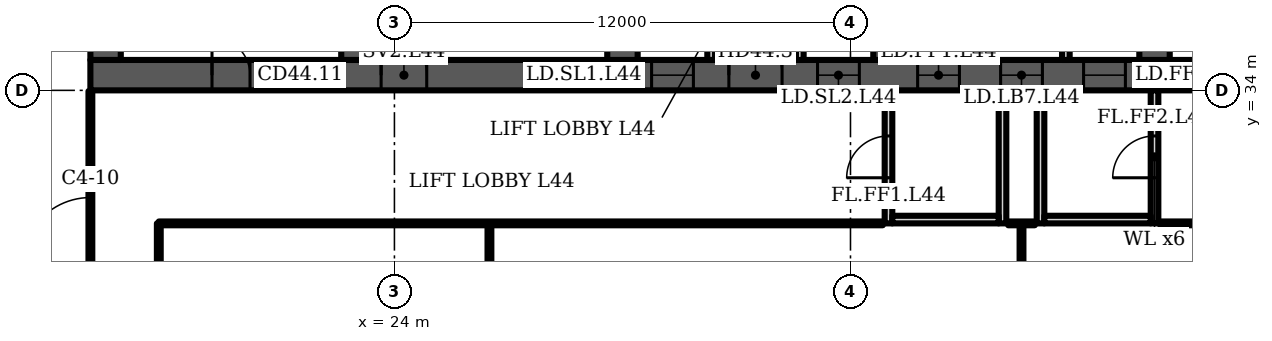
"""IFC4 building model, lengths in metres.
Left out: names, types, materials, properties, quantities, classifications, styles, units other than length and angle.
Written with IfcOpenShell. Run it as: python <this file> out.ifc"""

import sys

from ifc_helpers import new_model, si_unit, direction, frame, frame_2d, origin, place, context, subcontext, project, spatial, polyline, rectangle, outline, extrude, element, fill, save


model = new_model("IFC4")
c1 = context("Model", 3, precision=1e-05, world=origin(), true_north=direction((0.0, 1.0)))
c2 = subcontext(c1, "Body", "Model", "MODEL_VIEW")
j1 = project(units=[si_unit("LENGTHUNIT", "METRE"), si_unit("PLANEANGLEUNIT", "RADIAN")], contexts=[c1])
p1 = place(None, origin())
s1 = spatial("IfcSite", under=j1, at=p1, CompositionType="ELEMENT")
p2 = place(p1, origin())
s2 = spatial("IfcBuilding", under=s1, at=p2, CompositionType="ELEMENT")
p3 = place(p2, frame((0.0, 0.0, 180.7)))
s3 = spatial("IfcBuildingStorey", under=s2, at=p3, CompositionType="ELEMENT", Elevation=180.7)
p4 = place(p3, frame((16.0, 34.4, 0.0), z_axis=(0.0, 0.0, 1.0), x_axis=(1.0, 0.0, 0.0)))
e1 = element("IfcWall", 1, at=p4, inside=s3, PredefinedType="SHEAR", context=c2, shape_type="SweptSolid", body=[
    extrude(rectangle(XDim=42.0, YDim=0.8, at=frame_2d((21.0, 0.0))), origin(), (0.0, 0.0, 1.0), 3.6),
])
p5 = place(p4, frame((3.2, 0.0, 0.0)))
e2 = element("IfcOpeningElement", 2, at=p5, cuts=e1, PredefinedType="OPENING", context=c2, shape_type="SweptSolid", body=[
    extrude(rectangle(XDim=1.0, YDim=2.1, at=frame_2d((0.5, 1.05))), frame((0.0, 0.41, 0.0), z_axis=(0.0, -1.0, 0.0), x_axis=(1.0, 0.0, 0.0)), (0.0, 0.0, 1.0), 0.82),
])
p6 = place(p4, frame((7.65, 0.0, 0.0)))
e3 = element("IfcOpeningElement", 3, at=p6, cuts=e1, PredefinedType="OPENING", context=c2, shape_type="SweptSolid", body=[
    extrude(rectangle(XDim=1.2, YDim=2.1, at=frame_2d((0.6, 1.05))), frame((0.0, 0.41, 0.0), z_axis=(0.0, -1.0, 0.0), x_axis=(1.0, 0.0, 0.0)), (0.0, 0.0, 1.0), 0.82),
])
p7 = place(p4, frame((14.767, 0.0, 0.0)))
e4 = element("IfcOpeningElement", 4, at=p7, cuts=e1, PredefinedType="OPENING", context=c2, shape_type="SweptSolid", body=[
    extrude(rectangle(XDim=1.1, YDim=2.1, at=frame_2d((0.55, 1.05))), frame((0.0, 0.41, 0.0), z_axis=(0.0, -1.0, 0.0), x_axis=(1.0, 0.0, 0.0)), (0.0, 0.0, 1.0), 0.82),
])
p8 = place(p4, frame((19.133, 0.0, 0.0)))
e5 = element("IfcOpeningElement", 5, at=p8, cuts=e1, PredefinedType="OPENING", context=c2, shape_type="SweptSolid", body=[
    extrude(rectangle(XDim=1.1, YDim=2.1, at=frame_2d((0.55, 1.05))), frame((0.0, 0.41, 0.0), z_axis=(0.0, -1.0, 0.0), x_axis=(1.0, 0.0, 0.0)), (0.0, 0.0, 1.0), 0.82),
])
p9 = place(p4, frame((16.8, 0.0, 0.0)))
e6 = element("IfcOpeningElement", 6, at=p9, cuts=e1, PredefinedType="OPENING", context=c2, shape_type="SweptSolid", body=[
    extrude(rectangle(XDim=1.4, YDim=2.1, at=frame_2d((0.7, 1.05))), frame((0.0, 0.41, 0.0), z_axis=(0.0, -1.0, 0.0), x_axis=(1.0, 0.0, 0.0)), (0.0, 0.0, 1.0), 0.82),
])
p10 = place(p4, frame((21.767, 0.0, 0.0)))
e7 = element("IfcOpeningElement", 7, at=p10, cuts=e1, PredefinedType="OPENING", context=c2, shape_type="SweptSolid", body=[
    extrude(rectangle(XDim=1.1, YDim=2.1, at=frame_2d((0.55, 1.05))), frame((0.0, 0.41, 0.0), z_axis=(0.0, -1.0, 0.0), x_axis=(1.0, 0.0, 0.0)), (0.0, 0.0, 1.0), 0.82),
])
p11 = place(p4, frame((23.95, 0.0, 0.0)))
e8 = element("IfcOpeningElement", 8, at=p11, cuts=e1, PredefinedType="OPENING", context=c2, shape_type="SweptSolid", body=[
    extrude(rectangle(XDim=1.1, YDim=2.1, at=frame_2d((0.55, 1.05))), frame((0.0, 0.41, 0.0), z_axis=(0.0, -1.0, 0.0), x_axis=(1.0, 0.0, 0.0)), (0.0, 0.0, 1.0), 0.82),
])
p12 = place(p4, frame((26.133, 0.0, 0.0)))
e9 = element("IfcOpeningElement", 9, at=p12, cuts=e1, PredefinedType="OPENING", context=c2, shape_type="SweptSolid", body=[
    extrude(rectangle(XDim=1.1, YDim=2.1, at=frame_2d((0.55, 1.05))), frame((0.0, 0.41, 0.0), z_axis=(0.0, -1.0, 0.0), x_axis=(1.0, 0.0, 0.0)), (0.0, 0.0, 1.0), 0.82),
])
p13 = place(p4, frame((33.15, 0.0, 0.0)))
e10 = element("IfcOpeningElement", 10, at=p13, cuts=e1, PredefinedType="OPENING", context=c2, shape_type="SweptSolid", body=[
    extrude(rectangle(XDim=1.2, YDim=2.1, at=frame_2d((0.6, 1.05))), frame((0.0, 0.41, 0.0), z_axis=(0.0, -1.0, 0.0), x_axis=(1.0, 0.0, 0.0)), (0.0, 0.0, 1.0), 0.82),
])
p14 = place(p4, frame((37.767, 0.0, 0.0)))
e11 = element("IfcOpeningElement", 11, at=p14, cuts=e1, PredefinedType="OPENING", context=c2, shape_type="SweptSolid", body=[
    extrude(rectangle(XDim=1.4, YDim=2.1, at=frame_2d((0.7, 1.05))), frame((0.0, 0.41, 0.0), z_axis=(0.0, -1.0, 0.0), x_axis=(1.0, 0.0, 0.0)), (0.0, 0.0, 1.0), 0.82),
])
p15 = place(p3, frame((16.4, 34.8, 0.0), z_axis=(0.0, 0.0, 1.0), x_axis=(0.0, 1.0, 0.0)))
e12 = element("IfcWall", 12, at=p15, inside=s3, PredefinedType="SHEAR", context=c2, shape_type="SweptSolid", body=[
    extrude(rectangle(XDim=13.184, YDim=0.8, at=frame_2d((6.592, 0.0))), origin(), (0.0, 0.0, 1.0), 3.6),
])
p16 = place(p3, frame((23.0, 34.8, 0.0), z_axis=(0.0, 0.0, 1.0), x_axis=(0.0, 1.0, 0.0)))
e13 = element("IfcWall", 13, at=p16, inside=s3, PredefinedType="SHEAR", context=c2, shape_type="SweptSolid", body=[
    extrude(rectangle(XDim=13.762, YDim=0.8, at=frame_2d((6.881, 0.0))), origin(), (0.0, 0.0, 1.0), 3.6),
])
p17 = place(p16, frame((2.55, 0.0, 0.0)))
e14 = element("IfcOpeningElement", 14, at=p17, cuts=e13, PredefinedType="OPENING", context=c2, shape_type="SweptSolid", body=[
    extrude(rectangle(XDim=1.1, YDim=2.1, at=frame_2d((0.55, 1.05))), frame((0.0, 0.41, 0.0), z_axis=(0.0, -1.0, 0.0), x_axis=(1.0, 0.0, 0.0)), (0.0, 0.0, 1.0), 0.82),
])
p18 = place(p16, frame((10.0, 0.0, 0.0)))
e15 = element("IfcOpeningElement", 15, at=p18, cuts=e13, PredefinedType="OPENING", context=c2, shape_type="SweptSolid", body=[
    extrude(rectangle(XDim=1.0, YDim=2.1, at=frame_2d((0.5, 1.05))), frame((0.0, 0.41, 0.0), z_axis=(0.0, -1.0, 0.0), x_axis=(1.0, 0.0, 0.0)), (0.0, 0.0, 1.0), 0.82),
])
p19 = place(p3, frame((30.0, 34.8, 0.0), z_axis=(0.0, 0.0, 1.0), x_axis=(0.0, 1.0, 0.0)))
e16 = element("IfcWall", 16, at=p19, inside=s3, PredefinedType="SHEAR", context=c2, shape_type="SweptSolid", body=[
    extrude(rectangle(XDim=14.374, YDim=0.8, at=frame_2d((7.187, 0.0))), origin(), (0.0, 0.0, 1.0), 3.6),
])
p20 = place(p19, frame((3.6, 0.0, 0.0)))
e17 = element("IfcOpeningElement", 17, at=p20, cuts=e16, PredefinedType="OPENING", context=c2, shape_type="SweptSolid", body=[
    extrude(rectangle(XDim=1.1, YDim=2.1, at=frame_2d((0.55, 1.05))), frame((0.0, 0.41, 0.0), z_axis=(0.0, -1.0, 0.0), x_axis=(1.0, 0.0, 0.0)), (0.0, 0.0, 1.0), 0.82),
])
p21 = place(p3, frame((37.0, 34.8, 0.0), z_axis=(0.0, 0.0, 1.0), x_axis=(0.0, 1.0, 0.0)))
e18 = element("IfcWall", 18, at=p21, inside=s3, PredefinedType="SHEAR", context=c2, shape_type="SweptSolid", body=[
    extrude(rectangle(XDim=14.987, YDim=0.8, at=frame_2d((7.493, 0.0))), origin(), (0.0, 0.0, 1.0), 3.6),
])
p22 = place(p21, frame((11.312, 0.0, 0.0)))
e19 = element("IfcOpeningElement", 19, at=p22, cuts=e18, PredefinedType="OPENING", context=c2, shape_type="SweptSolid", body=[
    extrude(rectangle(XDim=1.0, YDim=2.1, at=frame_2d((0.5, 1.05))), frame((0.0, 0.41, 0.0), z_axis=(0.0, -1.0, 0.0), x_axis=(1.0, 0.0, 0.0)), (0.0, 0.0, 1.0), 0.82),
])
p23 = place(p21, frame((3.6, 0.0, 0.0)))
e20 = element("IfcOpeningElement", 20, at=p23, cuts=e18, PredefinedType="OPENING", context=c2, shape_type="SweptSolid", body=[
    extrude(rectangle(XDim=1.1, YDim=2.1, at=frame_2d((0.55, 1.05))), frame((0.0, 0.41, 0.0), z_axis=(0.0, -1.0, 0.0), x_axis=(1.0, 0.0, 0.0)), (0.0, 0.0, 1.0), 0.82),
])
p24 = place(p3, frame((44.0, 34.8, 0.0), z_axis=(0.0, 0.0, 1.0), x_axis=(0.0, 1.0, 0.0)))
e21 = element("IfcWall", 21, at=p24, inside=s3, PredefinedType="SHEAR", context=c2, shape_type="SweptSolid", body=[
    extrude(rectangle(XDim=14.374, YDim=0.8, at=frame_2d((7.187, 0.0))), origin(), (0.0, 0.0, 1.0), 3.6),
])
p25 = place(p24, frame((11.312, 0.0, 0.0)))
e22 = element("IfcOpeningElement", 22, at=p25, cuts=e21, PredefinedType="OPENING", context=c2, shape_type="SweptSolid", body=[
    extrude(rectangle(XDim=1.0, YDim=2.1, at=frame_2d((0.5, 1.05))), frame((0.0, 0.41, 0.0), z_axis=(0.0, -1.0, 0.0), x_axis=(1.0, 0.0, 0.0)), (0.0, 0.0, 1.0), 0.82),
])
p26 = place(p24, frame((3.6, 0.0, 0.0)))
e23 = element("IfcOpeningElement", 23, at=p26, cuts=e21, PredefinedType="OPENING", context=c2, shape_type="SweptSolid", body=[
    extrude(rectangle(XDim=1.1, YDim=2.1, at=frame_2d((0.55, 1.05))), frame((0.0, 0.41, 0.0), z_axis=(0.0, -1.0, 0.0), x_axis=(1.0, 0.0, 0.0)), (0.0, 0.0, 1.0), 0.82),
])
p27 = place(p3, frame((0.0, 0.0, -0.0)))
e24 = element("IfcWall", 24, at=p27, inside=s3, PredefinedType="PARTITIONING", context=c2, shape_type="SweptSolid", body=[
    extrude(outline(polyline([(32.233, 37.65), (30.4, 37.65), (30.4, 37.85), (32.233, 37.85), (32.433, 37.85), (32.433, 34.8), (32.233, 34.8), (32.233, 37.65)])), origin(), (0.0, 0.0, 1.0), 3.2),
])
p28 = place(p3, frame((0.0, 0.0, -0.0)))
e25 = element("IfcWall", 25, at=p28, inside=s3, PredefinedType="PARTITIONING", context=c2, shape_type="SweptSolid", body=[
    extrude(outline(polyline([(34.567, 37.85), (34.767, 37.85), (36.6, 37.85), (36.6, 37.65), (34.767, 37.65), (34.767, 34.8), (34.567, 34.8), (34.567, 37.85)])), origin(), (0.0, 0.0, 1.0), 3.2),
])
p29 = place(p3, frame((0.0, 0.0, -0.0)))
e26 = element("IfcWall", 26, at=p29, inside=s3, PredefinedType="PARTITIONING", context=c2, shape_type="SweptSolid", body=[
    extrude(outline(polyline([(41.567, 37.1), (39.433, 37.1), (39.433, 34.8), (39.233, 34.8), (39.233, 37.65), (37.4, 37.65), (37.4, 37.85), (39.233, 37.85), (39.433, 37.85), (39.433, 37.3), (41.567, 37.3), (41.567, 37.55), (41.767, 37.55), (43.6, 37.55), (43.6, 37.35), (41.767, 37.35), (41.767, 34.8), (41.567, 34.8), (41.567, 37.1)])), origin(), (0.0, 0.0, 1.0), 3.2),
])
p30 = place(p3, frame((37.0, 30.5, 0.0), z_axis=(0.0, 0.0, 1.0), x_axis=(0.0, 1.0, 0.0)))
e27 = element("IfcWall", 27, at=p30, inside=s3, PredefinedType="PARTITIONING", context=c2, shape_type="SweptSolid", body=[
    extrude(rectangle(XDim=3.5, YDim=0.2, at=frame_2d((1.75, 0.0))), origin(), (0.0, 0.0, 1.0), 3.2),
])
p31 = place(p30, frame((1.2, 0.0, 0.0)))
e28 = element("IfcOpeningElement", 28, at=p31, cuts=e27, PredefinedType="OPENING", context=c2, shape_type="SweptSolid", body=[
    extrude(rectangle(XDim=1.1, YDim=2.1, at=frame_2d((0.55, 1.05))), frame((0.0, 0.11, 0.0), z_axis=(0.0, -1.0, 0.0), x_axis=(1.0, 0.0, 0.0)), (0.0, 0.0, 1.0), 0.22),
])
p32 = place(p3, frame((40.0, 30.5, 0.0), z_axis=(0.0, 0.0, 1.0), x_axis=(0.0, 1.0, 0.0)))
e29 = element("IfcWall", 29, at=p32, inside=s3, PredefinedType="PARTITIONING", context=c2, shape_type="SweptSolid", body=[
    extrude(rectangle(XDim=3.5, YDim=0.2, at=frame_2d((1.75, 0.0))), origin(), (0.0, 0.0, 1.0), 3.2),
])
p33 = place(p3, frame((37.1, 30.6, 0.0), z_axis=(0.0, 0.0, 1.0), x_axis=(1.0, 0.0, 0.0)))
e30 = element("IfcWall", 30, at=p33, inside=s3, PredefinedType="PARTITIONING", context=c2, shape_type="SweptSolid", body=[
    extrude(rectangle(XDim=2.8, YDim=0.2, at=frame_2d((1.4, 0.0))), origin(), (0.0, 0.0, 1.0), 3.2),
])
p34 = place(p3, frame((41.0, 30.5, 0.0), z_axis=(0.0, 0.0, 1.0), x_axis=(0.0, 1.0, 0.0)))
e31 = element("IfcWall", 31, at=p34, inside=s3, PredefinedType="PARTITIONING", context=c2, shape_type="SweptSolid", body=[
    extrude(rectangle(XDim=3.5, YDim=0.2, at=frame_2d((1.75, 0.0))), origin(), (0.0, 0.0, 1.0), 3.2),
])
p35 = place(p3, frame((44.0, 30.5, 0.0), z_axis=(0.0, 0.0, 1.0), x_axis=(0.0, 1.0, 0.0)))
e32 = element("IfcWall", 32, at=p35, inside=s3, PredefinedType="PARTITIONING", context=c2, shape_type="SweptSolid", body=[
    extrude(rectangle(XDim=3.5, YDim=0.2, at=frame_2d((1.75, 0.0))), origin(), (0.0, 0.0, 1.0), 3.2),
])
p36 = place(p35, frame((1.2, 0.0, 0.0)))
e33 = element("IfcOpeningElement", 33, at=p36, cuts=e32, PredefinedType="OPENING", context=c2, shape_type="SweptSolid", body=[
    extrude(rectangle(XDim=1.1, YDim=2.1, at=frame_2d((0.55, 1.05))), frame((0.0, 0.11, 0.0), z_axis=(0.0, -1.0, 0.0), x_axis=(1.0, 0.0, 0.0)), (0.0, 0.0, 1.0), 0.22),
])
p37 = place(p3, frame((41.1, 30.6, 0.0), z_axis=(0.0, 0.0, 1.0), x_axis=(1.0, 0.0, 0.0)))
e34 = element("IfcWall", 34, at=p37, inside=s3, PredefinedType="PARTITIONING", context=c2, shape_type="SweptSolid", body=[
    extrude(rectangle(XDim=2.8, YDim=0.2, at=frame_2d((1.4, 0.0))), origin(), (0.0, 0.0, 1.0), 3.2),
])
p38 = place(p3, frame((16.0, 26.42, 0.0), z_axis=(0.0, 0.0, 1.0), x_axis=(0.0, 1.0, 0.0)))
e35 = element("IfcWall", 35, at=p38, inside=s3, PredefinedType="PARTITIONING", context=c2, shape_type="SweptSolid", body=[
    extrude(rectangle(XDim=7.56, YDim=0.1, at=frame_2d((3.78, 0.0))), origin(), (0.0, 0.0, 1.0), 3.2),
])
p39 = place(p38, frame((2.96, 0.0, 0.0)))
e36 = element("IfcOpeningElement", 36, at=p39, cuts=e35, PredefinedType="OPENING", context=c2, shape_type="SweptSolid", body=[
    extrude(rectangle(XDim=1.8, YDim=2.1, at=frame_2d((0.9, 1.05))), frame((0.0, 0.06, 0.0), z_axis=(0.0, -1.0, 0.0), x_axis=(1.0, 0.0, 0.0)), (0.0, 0.0, 1.0), 0.12),
])
p40 = place(p3, frame((17.8, 25.485, 0.0), z_axis=(0.0, 0.0, 1.0), x_axis=(0.0, 1.0, 0.0)))
e37 = element("IfcWall", 37, at=p40, inside=s3, PredefinedType="PARTITIONING", context=c2, shape_type="SweptSolid", body=[
    extrude(rectangle(XDim=5.015, YDim=0.1, at=frame_2d((2.507, 0.0))), origin(), (0.0, 0.0, 1.0), 3.2),
])
p41 = place(p3, frame((17.8, 30.5, 0.0), z_axis=(0.0, 0.0, 1.0), x_axis=(1.0, 0.0, 0.0)))
e38 = element("IfcWall", 38, at=p41, inside=s3, PredefinedType="PARTITIONING", context=c2, shape_type="SweptSolid", body=[
    extrude(rectangle(XDim=19.05, YDim=0.1, at=frame_2d((9.525, 0.0))), origin(), (0.0, 0.0, 1.0), 3.2),
])
p42 = place(p3, frame((26.5, 13.535, 0.0), z_axis=(0.0, 0.0, 1.0), x_axis=(0.0, 1.0, 0.0)))
e39 = element("IfcWall", 39, at=p42, inside=s3, PredefinedType="PARTITIONING", context=c2, shape_type="SweptSolid", body=[
    extrude(rectangle(XDim=16.965, YDim=0.1, at=frame_2d((8.482, 0.0))), origin(), (0.0, 0.0, 1.0), 3.2),
])
p43 = place(p3, frame((40.5, 1.489, 0.0), z_axis=(0.0, 0.0, 1.0), x_axis=(0.0, 1.0, 0.0)))
e40 = element("IfcWall", 40, at=p43, inside=s3, PredefinedType="PARTITIONING", context=c2, shape_type="SweptSolid", body=[
    extrude(rectangle(XDim=29.011, YDim=0.1, at=frame_2d((14.505, 0.0))), origin(), (0.0, 0.0, 1.0), 3.2),
])
p44 = place(p3, frame((40.15, 30.5, 0.0), z_axis=(0.0, 0.0, 1.0), x_axis=(1.0, 0.0, 0.0)))
e41 = element("IfcWall", 41, at=p44, inside=s3, PredefinedType="PARTITIONING", context=c2, shape_type="SweptSolid", body=[
    extrude(rectangle(XDim=0.7, YDim=0.1, at=frame_2d((0.35, 0.0))), origin(), (0.0, 0.0, 1.0), 3.2),
])
p45 = place(p3, frame((44.15, 30.5, 0.0), z_axis=(0.0, 0.0, 1.0), x_axis=(1.0, 0.0, 0.0)))
e42 = element("IfcWall", 42, at=p45, inside=s3, PredefinedType="PARTITIONING", context=c2, shape_type="SweptSolid", body=[
    extrude(rectangle(XDim=12.95, YDim=0.1, at=frame_2d((6.475, 0.0))), origin(), (0.0, 0.0, 1.0), 3.2),
])
p46 = place(p45, frame((3.17, 0.0, 0.0)))
e43 = element("IfcOpeningElement", 43, at=p46, cuts=e42, PredefinedType="OPENING", context=c2, shape_type="SweptSolid", body=[
    extrude(rectangle(XDim=1.8, YDim=2.1, at=frame_2d((0.9, 1.05))), frame((0.0, 0.06, 0.0), z_axis=(0.0, -1.0, 0.0), x_axis=(1.0, 0.0, 0.0)), (0.0, 0.0, 1.0), 0.12),
])
p47 = place(p5, origin())
e44 = element("IfcDoor", 44, at=p47, inside=s3, OperationType="SINGLE_SWING_LEFT", PredefinedType="DOOR", context=c2, shape_type="SweptSolid", body=[
    extrude(rectangle(XDim=1.0, YDim=2.1, at=frame_2d((0.5, 1.05))), frame((0.0, 0.4, 0.0), z_axis=(0.0, -1.0, 0.0), x_axis=(1.0, 0.0, 0.0)), (0.0, 0.0, 1.0), 0.8),
])
fill(e2, e44)
p48 = place(p6, origin())
e45 = element("IfcDoor", 45, at=p48, inside=s3, OperationType="SINGLE_SWING_LEFT", PredefinedType="DOOR", context=c2, shape_type="SweptSolid", body=[
    extrude(rectangle(XDim=1.2, YDim=2.1, at=frame_2d((0.6, 1.05))), frame((0.0, 0.025, 0.0), z_axis=(0.0, -1.0, 0.0), x_axis=(1.0, 0.0, 0.0)), (0.0, 0.0, 1.0), 0.05),
])
fill(e3, e45)
p49 = place(p7, origin())
e46 = element("IfcDoor", 46, at=p49, inside=s3, OperationType="DOUBLE_DOOR_SLIDING", PredefinedType="DOOR", context=c2, shape_type="SweptSolid", body=[
    extrude(rectangle(XDim=1.1, YDim=2.1, at=frame_2d((0.55, 1.05))), frame((0.0, 0.025, 0.0), z_axis=(0.0, -1.0, 0.0), x_axis=(1.0, 0.0, 0.0)), (0.0, 0.0, 1.0), 0.05),
])
fill(e4, e46)
p50 = place(p8, origin())
e47 = element("IfcDoor", 47, at=p50, inside=s3, OperationType="DOUBLE_DOOR_SLIDING", PredefinedType="DOOR", context=c2, shape_type="SweptSolid", body=[
    extrude(rectangle(XDim=1.1, YDim=2.1, at=frame_2d((0.55, 1.05))), frame((0.0, 0.025, 0.0), z_axis=(0.0, -1.0, 0.0), x_axis=(1.0, 0.0, 0.0)), (0.0, 0.0, 1.0), 0.05),
])
fill(e5, e47)
p51 = place(p9, origin())
e48 = element("IfcDoor", 48, at=p51, inside=s3, OperationType="DOUBLE_DOOR_SINGLE_SWING", PredefinedType="DOOR", context=c2, shape_type="SweptSolid", body=[
    extrude(rectangle(XDim=1.4, YDim=2.1, at=frame_2d((0.7, 1.05))), frame((0.0, 0.025, 0.0), z_axis=(0.0, -1.0, 0.0), x_axis=(1.0, 0.0, 0.0)), (0.0, 0.0, 1.0), 0.05),
])
fill(e6, e48)
p52 = place(p10, origin())
e49 = element("IfcDoor", 49, at=p52, inside=s3, OperationType="DOUBLE_DOOR_SLIDING", PredefinedType="DOOR", context=c2, shape_type="SweptSolid", body=[
    extrude(rectangle(XDim=1.1, YDim=2.1, at=frame_2d((0.55, 1.05))), frame((0.0, 0.025, 0.0), z_axis=(0.0, -1.0, 0.0), x_axis=(1.0, 0.0, 0.0)), (0.0, 0.0, 1.0), 0.05),
])
fill(e7, e49)
p53 = place(p11, origin())
e50 = element("IfcDoor", 50, at=p53, inside=s3, OperationType="DOUBLE_DOOR_SLIDING", PredefinedType="DOOR", context=c2, shape_type="SweptSolid", body=[
    extrude(rectangle(XDim=1.1, YDim=2.1, at=frame_2d((0.55, 1.05))), frame((0.0, 0.025, 0.0), z_axis=(0.0, -1.0, 0.0), x_axis=(1.0, 0.0, 0.0)), (0.0, 0.0, 1.0), 0.05),
])
fill(e8, e50)
p54 = place(p12, origin())
e51 = element("IfcDoor", 51, at=p54, inside=s3, OperationType="DOUBLE_DOOR_SLIDING", PredefinedType="DOOR", context=c2, shape_type="SweptSolid", body=[
    extrude(rectangle(XDim=1.1, YDim=2.1, at=frame_2d((0.55, 1.05))), frame((0.0, 0.025, 0.0), z_axis=(0.0, -1.0, 0.0), x_axis=(1.0, 0.0, 0.0)), (0.0, 0.0, 1.0), 0.05),
])
fill(e9, e51)
p55 = place(p31, origin())
e52 = element("IfcDoor", 52, at=p55, inside=s3, OperationType="SINGLE_SWING_LEFT", PredefinedType="DOOR", context=c2, shape_type="SweptSolid", body=[
    extrude(rectangle(XDim=1.1, YDim=2.1, at=frame_2d((0.55, 1.05))), frame((0.0, 0.025, 0.0), z_axis=(0.0, -1.0, 0.0), x_axis=(1.0, 0.0, 0.0)), (0.0, 0.0, 1.0), 0.05),
])
fill(e28, e52)
p56 = place(p36, origin())
e53 = element("IfcDoor", 53, at=p56, inside=s3, OperationType="SINGLE_SWING_LEFT", PredefinedType="DOOR", context=c2, shape_type="SweptSolid", body=[
    extrude(rectangle(XDim=1.1, YDim=2.1, at=frame_2d((0.55, 1.05))), frame((0.0, 0.025, 0.0), z_axis=(0.0, -1.0, 0.0), x_axis=(1.0, 0.0, 0.0)), (0.0, 0.0, 1.0), 0.05),
])
fill(e33, e53)
p57 = place(p39, origin())
e54 = element("IfcDoor", 54, at=p57, inside=s3, OperationType="DOUBLE_DOOR_SINGLE_SWING", PredefinedType="DOOR", context=c2, shape_type="SweptSolid", body=[
    extrude(rectangle(XDim=1.8, YDim=2.1, at=frame_2d((0.9, 1.05))), frame((0.0, 0.025, 0.0), z_axis=(0.0, -1.0, 0.0), x_axis=(1.0, 0.0, 0.0)), (0.0, 0.0, 1.0), 0.05),
])
fill(e36, e54)
save(model, sys.argv[1])
